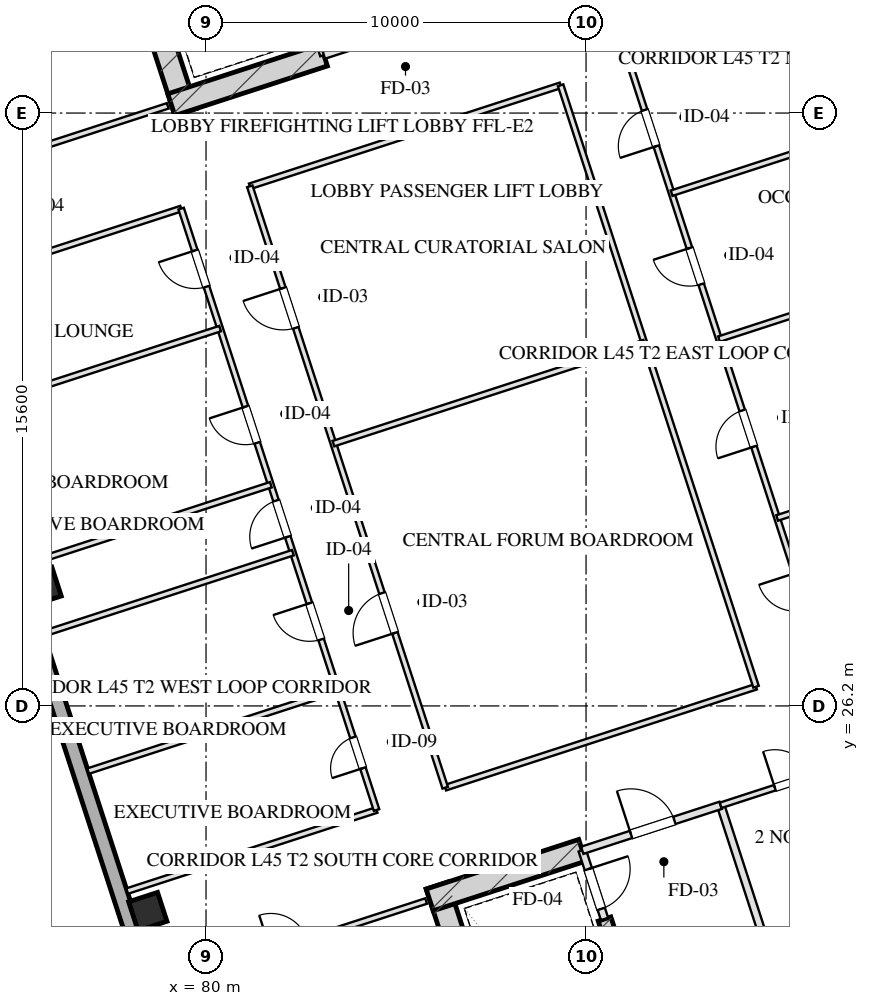
"""IFC4 building model, lengths in metres.
Left out: names, types, materials, properties, quantities, classifications, styles, units other than length and angle.
Written with IfcOpenShell. Run it as: python <this file> out.ifc"""

import sys

from ifc_helpers import new_model, si_unit, direction, frame, frame_2d, origin, origin_2d, place, context, subcontext, project, spatial, rectangle, hollow_rectangle, extrude, element, fill, save


model = new_model("IFC4")
c1 = context("Model", 3, precision=1e-05, world=origin(), true_north=direction((0.0, 1.0)))
c2 = subcontext(c1, "Body", "Model", "MODEL_VIEW")
j1 = project(units=[si_unit("LENGTHUNIT", "METRE"), si_unit("PLANEANGLEUNIT", "RADIAN")], contexts=[c1])
p1 = place(None, origin())
s1 = spatial("IfcSite", under=j1, at=p1, CompositionType="ELEMENT")
p2 = place(p1, origin())
s2 = spatial("IfcBuilding", under=s1, at=p2, CompositionType="ELEMENT")
p3 = place(p2, frame((0.0, 0.0, 170.2)))
s3 = spatial("IfcBuildingStorey", under=s2, at=p3, CompositionType="ELEMENT", Elevation=170.2)
p4 = place(p3, frame((86.078, 21.475, 0.0), z_axis=(0.0, 0.0, 1.0), x_axis=(0.309017938678, -0.951056209472, 0.0)))
e1 = element("IfcWall", 1, at=p4, inside=s3, PredefinedType="SHEAR", context=c2, shape_type="SweptSolid", body=[
    extrude(rectangle(XDim=9.48, YDim=0.6, at=frame_2d((4.74, 0.0))), origin(), (0.0, 0.0, 1.0), 3.45),
])
p5 = place(p3, frame((90.486, 20.594, 0.0), z_axis=(0.0, 0.0, 1.0), x_axis=(0.309020428229, -0.951055400562, 0.0)))
e2 = element("IfcWall", 2, at=p5, inside=s3, PredefinedType="SHEAR", context=c2, shape_type="SweptSolid", body=[
    extrude(rectangle(XDim=6.98, YDim=0.35, at=frame_2d((3.49, 0.0))), origin(), (0.0, 0.0, 1.0), 3.45),
])
p6 = place(p3, frame((85.886, 21.097, 0.0), z_axis=(0.0, 0.0, 1.0), x_axis=(0.951068073652, 0.308981422225, 0.0)))
e3 = element("IfcWall", 3, at=p6, inside=s3, PredefinedType="SHEAR", context=c2, shape_type="SweptSolid", body=[
    extrude(rectangle(XDim=4.22, YDim=0.6, at=frame_2d((2.11, 0.0))), origin(), (0.0, 0.0, 1.0), 3.45),
])
p7 = place(p3, frame((79.466, 41.828, 0.0), z_axis=(0.0, 0.0, 1.0), x_axis=(-0.309041232772, 0.951048640421, 0.0)))
e4 = element("IfcWall", 4, at=p7, inside=s3, PredefinedType="SHEAR", context=c2, shape_type="SweptSolid", body=[
    extrude(rectangle(XDim=9.48, YDim=0.6, at=frame_2d((4.74, 0.0))), origin(), (0.0, 0.0, 1.0), 3.45),
])
p8 = place(p3, frame((79.087, 42.021, 0.0), z_axis=(0.0, 0.0, 1.0), x_axis=(0.951062550203, 0.3089984233, 0.0)))
e5 = element("IfcWall", 5, at=p8, inside=s3, PredefinedType="SHEAR", context=c2, shape_type="SweptSolid", body=[
    extrude(rectangle(XDim=4.22, YDim=0.6, at=frame_2d((2.11, 0.0))), origin(), (0.0, 0.0, 1.0), 3.45),
])
for number, where, z_axis, x_axis in (
    (6, (78.468, 20.79, 0.0), (0.0, 0.0, 1.0), (0.951, 0.309, 0.0)),
    (7, (75.687, 29.349, 0.0), (0.0, 0.0, 1.0), (0.951, 0.309, 0.0)),
):
    element("IfcColumn", number, at=place(p3, frame(where, z_axis=z_axis, x_axis=x_axis)), inside=s3, PredefinedType="COLUMN", context=c2, shape_type="SweptSolid", body=[
        extrude(hollow_rectangle(XDim=0.8, YDim=0.8, WallThickness=0.028, at=origin_2d()), origin(), (0.0, 0.0, 1.0), 3.451),
    ])
p9 = place(p3, frame((81.776, 8.827, 0.0), z_axis=(0.0, 0.0, 1.0), x_axis=(-0.309014228706, 0.951057414911, 0.0)))
e8 = element("IfcWall", 8, at=p9, inside=s3, PredefinedType="SOLIDWALL", context=c2, shape_type="SweptSolid", body=[
    extrude(rectangle(XDim=42.8, YDim=0.4, at=frame_2d((21.4, 0.0))), origin(), (0.0, 0.0, 1.0), 2.61),
])
p10 = place(p3, frame((89.899, 22.401, 0.0), z_axis=(0.0, 0.0, 1.0), x_axis=(0.308932062672, -0.951084108086, 0.0)))
e9 = element("IfcWall", 9, at=p10, inside=s3, PredefinedType="PARTITIONING", context=c2, shape_type="SweptSolid", body=[
    extrude(rectangle(XDim=1.9, YDim=0.2, at=frame_2d((0.95, 0.0))), origin(), (0.0, 0.0, 1.0), 3.175),
])
p11 = place(p10, frame((0.52, 0.0, 0.0)))
e10 = element("IfcOpeningElement", 10, at=p11, cuts=e9, PredefinedType="OPENING", context=c2, shape_type="SweptSolid", body=[
    extrude(rectangle(XDim=1.1, YDim=2.05, at=frame_2d((0.55, 1.025))), frame((0.0, 0.11, 0.0), z_axis=(0.0, -1.0, 0.0), x_axis=(1.0, 0.0, 0.0)), (0.0, 0.0, 1.0), 0.22),
])
p12 = place(p3, frame((93.542, 23.585, 0.0), z_axis=(0.0, 0.0, 1.0), x_axis=(0.309042196757, -0.951048327176, 0.0)))
e11 = element("IfcWall", 11, at=p12, inside=s3, PredefinedType="PARTITIONING", context=c2, shape_type="SweptSolid", body=[
    extrude(rectangle(XDim=8.43, YDim=0.2, at=frame_2d((4.215, 0.0))), origin(), (0.0, 0.0, 1.0), 3.175),
])
p13 = place(p3, frame((89.899, 22.401, 0.0), z_axis=(0.0, 0.0, 1.0), x_axis=(0.951046716504, 0.309047153403, 0.0)))
e12 = element("IfcWall", 12, at=p13, inside=s3, PredefinedType="PARTITIONING", context=c2, shape_type="SweptSolid", body=[
    extrude(rectangle(XDim=3.83, YDim=0.2, at=frame_2d((1.915, 0.0))), origin(), (0.0, 0.0, 1.0), 3.175),
])
p14 = place(p13, frame((1.35, 0.0, 0.0)))
e13 = element("IfcOpeningElement", 13, at=p14, cuts=e12, PredefinedType="OPENING", context=c2, shape_type="SweptSolid", body=[
    extrude(rectangle(XDim=1.2, YDim=2.05, at=frame_2d((0.6, 1.025))), frame((0.0, 0.11, 0.0), z_axis=(0.0, -1.0, 0.0), x_axis=(1.0, 0.0, 0.0)), (0.0, 0.0, 1.0), 0.22),
])
p15 = place(p3, frame((93.542, 23.585, 0.0), z_axis=(0.0, 0.0, 1.0), x_axis=(0.951063829732, 0.308994485023, 0.0)))
e14 = element("IfcWall", 14, at=p15, inside=s3, PredefinedType="PARTITIONING", context=c2, shape_type="SweptSolid", body=[
    extrude(rectangle(XDim=4.4, YDim=0.15, at=frame_2d((2.2, 0.0))), origin(), (0.0, 0.0, 1.0), 3.175),
])
p16 = place(p15, frame((1.5, 0.0, 0.0)))
e15 = element("IfcOpeningElement", 15, at=p16, cuts=e14, PredefinedType="OPENING", context=c2, shape_type="SweptSolid", body=[
    extrude(rectangle(XDim=1.0, YDim=2.05, at=frame_2d((0.5, 1.025))), frame((0.0, 0.085, 0.0), z_axis=(0.0, -1.0, 0.0), x_axis=(1.0, 0.0, 0.0)), (0.0, 0.0, 1.0), 0.17),
])
p17 = place(p3, frame((94.871, 19.495, 0.0), z_axis=(0.0, 0.0, 1.0), x_axis=(0.951042223598, 0.309060979314, 0.0)))
e16 = element("IfcWall", 16, at=p17, inside=s3, PredefinedType="PARTITIONING", context=c2, shape_type="SweptSolid", body=[
    extrude(rectangle(XDim=4.4, YDim=0.15, at=frame_2d((2.2, 0.0))), origin(), (0.0, 0.0, 1.0), 3.175),
])
p18 = place(p3, frame((83.101, 43.324, 0.0), z_axis=(0.0, 0.0, 1.0), x_axis=(-0.309048298632, 0.951046344356, 0.0)))
e17 = element("IfcWall", 17, at=p18, inside=s3, PredefinedType="PARTITIONING", context=c2, shape_type="SweptSolid", body=[
    extrude(rectangle(XDim=1.9, YDim=0.2, at=frame_2d((0.95, 0.0))), origin(), (0.0, 0.0, 1.0), 3.175),
])
p19 = place(p18, frame((0.52, 0.0, 0.0)))
e18 = element("IfcOpeningElement", 18, at=p19, cuts=e17, PredefinedType="OPENING", context=c2, shape_type="SweptSolid", body=[
    extrude(rectangle(XDim=1.1, YDim=2.05, at=frame_2d((0.55, 1.025))), frame((0.0, 0.11, 0.0), z_axis=(0.0, -1.0, 0.0), x_axis=(1.0, 0.0, 0.0)), (0.0, 0.0, 1.0), 0.22),
])
p20 = place(p3, frame((83.101, 43.324, 0.0), z_axis=(0.0, 0.0, 1.0), x_axis=(0.951052804469, 0.309028417967, 0.0)))
e19 = element("IfcWall", 19, at=p20, inside=s3, PredefinedType="PARTITIONING", context=c2, shape_type="SweptSolid", body=[
    extrude(rectangle(XDim=3.83, YDim=0.2, at=frame_2d((1.915, 0.0))), origin(), (0.0, 0.0, 1.0), 3.175),
])
p21 = place(p20, frame((1.35, 0.0, 0.0)))
e20 = element("IfcOpeningElement", 20, at=p21, cuts=e19, PredefinedType="OPENING", context=c2, shape_type="SweptSolid", body=[
    extrude(rectangle(XDim=1.2, YDim=2.05, at=frame_2d((0.6, 1.025))), frame((0.0, 0.11, 0.0), z_axis=(0.0, -1.0, 0.0), x_axis=(1.0, 0.0, 0.0)), (0.0, 0.0, 1.0), 0.22),
])
p22 = place(p3, frame((78.753, 18.78, 0.0), z_axis=(0.0, 0.0, 1.0), x_axis=(0.951060977215, 0.309003264738, 0.0)))
e21 = element("IfcWall", 21, at=p22, inside=s3, PredefinedType="PARTITIONING", context=c2, shape_type="SweptSolid", body=[
    extrude(rectangle(XDim=7.4, YDim=0.15, at=frame_2d((3.7, 0.0))), origin(), (0.0, 0.0, 1.0), 3.175),
])
p23 = place(p22, frame((3.108, 0.0, 0.0)))
e22 = element("IfcOpeningElement", 22, at=p23, cuts=e21, PredefinedType="OPENING", context=c2, shape_type="SweptSolid", body=[
    extrude(rectangle(XDim=1.0, YDim=2.05, at=frame_2d((0.5, 1.025))), frame((0.0, 0.085, 0.0), z_axis=(0.0, -1.0, 0.0), x_axis=(1.0, 0.0, 0.0)), (0.0, 0.0, 1.0), 0.17),
])
p24 = place(p3, frame((71.955, 39.703, 0.0), z_axis=(0.0, 0.0, 1.0), x_axis=(0.951060977215, 0.309003264738, 0.0)))
e23 = element("IfcWall", 23, at=p24, inside=s3, PredefinedType="PARTITIONING", context=c2, shape_type="SweptSolid", body=[
    extrude(rectangle(XDim=7.4, YDim=0.15, at=frame_2d((3.7, 0.0))), origin(), (0.0, 0.0, 1.0), 3.175),
])
p25 = place(p24, frame((3.108, 0.0, 0.0)))
e24 = element("IfcOpeningElement", 24, at=p25, cuts=e23, PredefinedType="OPENING", context=c2, shape_type="SweptSolid", body=[
    extrude(rectangle(XDim=1.0, YDim=2.05, at=frame_2d((0.5, 1.025))), frame((0.0, 0.085, 0.0), z_axis=(0.0, -1.0, 0.0), x_axis=(1.0, 0.0, 0.0)), (0.0, 0.0, 1.0), 0.17),
])
p26 = place(p3, frame((77.925, 21.328, 0.0), z_axis=(0.0, 0.0, 1.0), x_axis=(0.951061887302, 0.309000463626, 0.0)))
e25 = element("IfcWall", 25, at=p26, inside=s3, PredefinedType="PARTITIONING", context=c2, shape_type="SweptSolid", body=[
    extrude(rectangle(XDim=6.9, YDim=0.15, at=frame_2d((3.45, 0.0))), origin(), (0.0, 0.0, 1.0), 3.175),
])
p27 = place(p3, frame((86.294, 24.048, 0.0), z_axis=(0.0, 0.0, 1.0), x_axis=(0.951052008164, 0.309030868631, 0.0)))
e26 = element("IfcWall", 26, at=p27, inside=s3, PredefinedType="PARTITIONING", context=c2, shape_type="SweptSolid", body=[
    extrude(rectangle(XDim=8.6, YDim=0.15, at=frame_2d((4.3, 0.0))), origin(), (0.0, 0.0, 1.0), 3.175),
])
p28 = place(p3, frame((72.783, 37.154, 0.0), z_axis=(0.0, 0.0, 1.0), x_axis=(0.951051488548, 0.309032467762, 0.0)))
e27 = element("IfcWall", 27, at=p28, inside=s3, PredefinedType="PARTITIONING", context=c2, shape_type="SweptSolid", body=[
    extrude(rectangle(XDim=6.9, YDim=0.15, at=frame_2d((3.45, 0.0))), origin(), (0.0, 0.0, 1.0), 3.175),
])
p29 = place(p3, frame((81.152, 39.873, 0.0), z_axis=(0.0, 0.0, 1.0), x_axis=(0.951057640494, 0.309013534425, 0.0)))
e28 = element("IfcWall", 28, at=p29, inside=s3, PredefinedType="PARTITIONING", context=c2, shape_type="SweptSolid", body=[
    extrude(rectangle(XDim=8.6, YDim=0.15, at=frame_2d((4.3, 0.0))), origin(), (0.0, 0.0, 1.0), 3.175),
])
p30 = place(p3, frame((91.138, 43.118, 0.0), z_axis=(0.0, 0.0, 1.0), x_axis=(0.951054972381, 0.309021746015, 0.0)))
e29 = element("IfcWall", 29, at=p30, inside=s3, PredefinedType="PARTITIONING", context=c2, shape_type="SweptSolid", body=[
    extrude(rectangle(XDim=11.5, YDim=0.15, at=frame_2d((5.75, 0.0))), origin(), (0.0, 0.0, 1.0), 3.175),
])
p31 = place(p3, frame((84.487, 23.46, 0.0), z_axis=(0.0, 0.0, 1.0), x_axis=(-0.30901773025, 0.951056277195, 0.0)))
e30 = element("IfcWall", 30, at=p31, inside=s3, PredefinedType="PARTITIONING", context=c2, shape_type="SweptSolid", body=[
    extrude(rectangle(XDim=16.64, YDim=0.15, at=frame_2d((8.32, 0.0))), origin(), (0.0, 0.0, 1.0), 3.175),
])
p32 = place(p31, frame((1.16, 0.0, 0.0)))
e31 = element("IfcOpeningElement", 31, at=p32, cuts=e30, PredefinedType="OPENING", context=c2, shape_type="SweptSolid", body=[
    extrude(rectangle(XDim=0.85, YDim=2.05, at=frame_2d((0.425, 1.025))), frame((0.0, 0.085, 0.0), z_axis=(0.0, -1.0, 0.0), x_axis=(1.0, 0.0, 0.0)), (0.0, 0.0, 1.0), 0.17),
])
p33 = place(p31, frame((4.72, 0.0, 0.0)))
e32 = element("IfcOpeningElement", 32, at=p33, cuts=e30, PredefinedType="OPENING", context=c2, shape_type="SweptSolid", body=[
    extrude(rectangle(XDim=1.0, YDim=2.05, at=frame_2d((0.5, 1.025))), frame((0.0, 0.085, 0.0), z_axis=(0.0, -1.0, 0.0), x_axis=(1.0, 0.0, 0.0)), (0.0, 0.0, 1.0), 0.17),
])
p34 = place(p31, frame((7.56, 0.0, 0.0)))
e33 = element("IfcOpeningElement", 33, at=p34, cuts=e30, PredefinedType="OPENING", context=c2, shape_type="SweptSolid", body=[
    extrude(rectangle(XDim=1.0, YDim=2.05, at=frame_2d((0.5, 1.025))), frame((0.0, 0.085, 0.0), z_axis=(0.0, -1.0, 0.0), x_axis=(1.0, 0.0, 0.0)), (0.0, 0.0, 1.0), 0.17),
])
p35 = place(p31, frame((10.16, 0.0, 0.0)))
e34 = element("IfcOpeningElement", 34, at=p35, cuts=e30, PredefinedType="OPENING", context=c2, shape_type="SweptSolid", body=[
    extrude(rectangle(XDim=1.0, YDim=2.05, at=frame_2d((0.5, 1.025))), frame((0.0, 0.085, 0.0), z_axis=(0.0, -1.0, 0.0), x_axis=(1.0, 0.0, 0.0)), (0.0, 0.0, 1.0), 0.17),
])
p36 = place(p31, frame((14.48, 0.0, 0.0)))
e35 = element("IfcOpeningElement", 35, at=p36, cuts=e30, PredefinedType="OPENING", context=c2, shape_type="SweptSolid", body=[
    extrude(rectangle(XDim=1.0, YDim=2.05, at=frame_2d((0.5, 1.025))), frame((0.0, 0.085, 0.0), z_axis=(0.0, -1.0, 0.0), x_axis=(1.0, 0.0, 0.0)), (0.0, 0.0, 1.0), 0.17),
])
p37 = place(p3, frame((86.294, 24.048, 0.0), z_axis=(0.0, 0.0, 1.0), x_axis=(-0.309004459387, 0.951060589068, 0.0)))
e36 = element("IfcWall", 36, at=p37, inside=s3, PredefinedType="PARTITIONING", context=c2, shape_type="SweptSolid", body=[
    extrude(rectangle(XDim=16.64, YDim=0.15, at=frame_2d((8.32, 0.0))), origin(), (0.0, 0.0, 1.0), 3.175),
])
p38 = place(p37, frame((4.284, 0.0, 0.0)))
e37 = element("IfcOpeningElement", 37, at=p38, cuts=e36, PredefinedType="OPENING", context=c2, shape_type="SweptSolid", body=[
    extrude(rectangle(XDim=1.1, YDim=2.05, at=frame_2d((0.55, 1.025))), frame((0.0, 0.085, 0.0), z_axis=(0.0, -1.0, 0.0), x_axis=(1.0, 0.0, 0.0)), (0.0, 0.0, 1.0), 0.17),
])
p39 = place(p37, frame((12.724, 0.0, 0.0)))
e38 = element("IfcOpeningElement", 38, at=p39, cuts=e36, PredefinedType="OPENING", context=c2, shape_type="SweptSolid", body=[
    extrude(rectangle(XDim=1.1, YDim=2.05, at=frame_2d((0.55, 1.025))), frame((0.0, 0.085, 0.0), z_axis=(0.0, -1.0, 0.0), x_axis=(1.0, 0.0, 0.0)), (0.0, 0.0, 1.0), 0.17),
])
p40 = place(p3, frame((94.473, 26.705, 0.0), z_axis=(0.0, 0.0, 1.0), x_axis=(-0.309022042254, 0.951054876125, 0.0)))
e39 = element("IfcWall", 39, at=p40, inside=s3, PredefinedType="PARTITIONING", context=c2, shape_type="SweptSolid", body=[
    extrude(rectangle(XDim=16.64, YDim=0.15, at=frame_2d((8.32, 0.0))), origin(), (0.0, 0.0, 1.0), 3.175),
])
p41 = place(p3, frame((96.28, 27.292, 0.0), z_axis=(0.0, 0.0, 1.0), x_axis=(-0.309008771245, 0.951059188113, 0.0)))
e40 = element("IfcWall", 40, at=p41, inside=s3, PredefinedType="PARTITIONING", context=c2, shape_type="SweptSolid", body=[
    extrude(rectangle(XDim=16.64, YDim=0.15, at=frame_2d((8.32, 0.0))), origin(), (0.0, 0.0, 1.0), 3.175),
])
p42 = place(p41, frame((1.526, 0.0, 0.0)))
e41 = element("IfcOpeningElement", 41, at=p42, cuts=e40, PredefinedType="OPENING", context=c2, shape_type="SweptSolid", body=[
    extrude(rectangle(XDim=1.0, YDim=2.05, at=frame_2d((0.5, 1.025))), frame((0.0, 0.085, 0.0), z_axis=(0.0, -1.0, 0.0), x_axis=(1.0, 0.0, 0.0)), (0.0, 0.0, 1.0), 0.17),
])
p43 = place(p41, frame((6.026, 0.0, 0.0)))
e42 = element("IfcOpeningElement", 42, at=p43, cuts=e40, PredefinedType="OPENING", context=c2, shape_type="SweptSolid", body=[
    extrude(rectangle(XDim=1.0, YDim=2.05, at=frame_2d((0.5, 1.025))), frame((0.0, 0.085, 0.0), z_axis=(0.0, -1.0, 0.0), x_axis=(1.0, 0.0, 0.0)), (0.0, 0.0, 1.0), 0.17),
])
p44 = place(p41, frame((10.519, 0.0, 0.0)))
e43 = element("IfcOpeningElement", 43, at=p44, cuts=e40, PredefinedType="OPENING", context=c2, shape_type="SweptSolid", body=[
    extrude(rectangle(XDim=1.0, YDim=2.05, at=frame_2d((0.5, 1.025))), frame((0.0, 0.085, 0.0), z_axis=(0.0, -1.0, 0.0), x_axis=(1.0, 0.0, 0.0)), (0.0, 0.0, 1.0), 0.17),
])
p45 = place(p41, frame((14.338, 0.0, 0.0)))
e44 = element("IfcOpeningElement", 44, at=p45, cuts=e40, PredefinedType="OPENING", context=c2, shape_type="SweptSolid", body=[
    extrude(rectangle(XDim=1.0, YDim=2.05, at=frame_2d((0.5, 1.025))), frame((0.0, 0.085, 0.0), z_axis=(0.0, -1.0, 0.0), x_axis=(1.0, 0.0, 0.0)), (0.0, 0.0, 1.0), 0.17),
])
p46 = place(p3, frame((83.352, 33.102, 0.0), z_axis=(0.0, 0.0, 1.0), x_axis=(0.951057640494, 0.309013534425, 0.0)))
e45 = element("IfcWall", 45, at=p46, inside=s3, PredefinedType="PARTITIONING", context=c2, shape_type="SweptSolid", body=[
    extrude(rectangle(XDim=8.6, YDim=0.15, at=frame_2d((4.3, 0.0))), origin(), (0.0, 0.0, 1.0), 3.175),
])
for number, where, z_axis, x_axis in (
    (46, (76.899, 24.486, 0.0), (0.0, 0.0, 1.0), (0.951, 0.309, 0.0)),
    (47, (75.725, 28.1, 0.0), (0.0, 0.0, 1.0), (0.951, 0.309, 0.0)),
    (48, (75.144, 29.888, 0.0), (0.0, 0.0, 1.0), (0.951, 0.309, 0.0)),
    (49, (73.809, 33.996, 0.0), (0.0, 0.0, 1.0), (0.951, 0.309, 0.0)),
):
    element("IfcWall", number, at=place(p3, frame(where, z_axis=z_axis, x_axis=x_axis)), inside=s3, PredefinedType="PARTITIONING", context=c2, shape_type="SweptSolid", body=[
        extrude(rectangle(XDim=6.9, YDim=0.15, at=frame_2d((3.45, 0.0))), origin(), (0.0, 0.0, 1.0), 3.175),
    ])
p47 = place(p3, frame((95.028, 31.146, 0.0), z_axis=(0.0, 0.0, 1.0), x_axis=(0.951056999652, 0.309015506751, 0.0)))
e50 = element("IfcWall", 50, at=p47, inside=s3, PredefinedType="PARTITIONING", context=c2, shape_type="SweptSolid", body=[
    extrude(rectangle(XDim=11.5, YDim=0.15, at=frame_2d((5.75, 0.0))), origin(), (0.0, 0.0, 1.0), 3.175),
])
p48 = place(p3, frame((93.499, 35.852, 0.0), z_axis=(0.0, 0.0, 1.0), x_axis=(0.951054972381, 0.309021746015, 0.0)))
e51 = element("IfcWall", 51, at=p48, inside=s3, PredefinedType="PARTITIONING", context=c2, shape_type="SweptSolid", body=[
    extrude(rectangle(XDim=11.5, YDim=0.15, at=frame_2d((5.75, 0.0))), origin(), (0.0, 0.0, 1.0), 3.175),
])
p49 = place(p3, frame((92.251, 39.691, 0.0), z_axis=(0.0, 0.0, 1.0), x_axis=(0.951063238644, 0.308996304347, 0.0)))
e52 = element("IfcWall", 52, at=p49, inside=s3, PredefinedType="PARTITIONING", context=c2, shape_type="SweptSolid", body=[
    extrude(rectangle(XDim=11.5, YDim=0.15, at=frame_2d((5.75, 0.0))), origin(), (0.0, 0.0, 1.0), 3.175),
])
p50 = place(p11, origin())
e53 = element("IfcDoor", 53, at=p50, inside=s3, OperationType="SINGLE_SWING_LEFT", PredefinedType="DOOR", context=c2, shape_type="SweptSolid", body=[
    extrude(rectangle(XDim=1.1, YDim=2.05, at=frame_2d((0.55, 1.025))), frame((0.0, 0.025, 0.0), z_axis=(0.0, -1.0, 0.0), x_axis=(1.0, 0.0, 0.0)), (0.0, 0.0, 1.0), 0.05),
])
fill(e10, e53)
p51 = place(p14, origin())
e54 = element("IfcDoor", 54, at=p51, inside=s3, OperationType="SINGLE_SWING_LEFT", PredefinedType="DOOR", context=c2, shape_type="SweptSolid", body=[
    extrude(rectangle(XDim=1.2, YDim=2.05, at=frame_2d((0.6, 1.025))), frame((0.0, 0.025, 0.0), z_axis=(0.0, -1.0, 0.0), x_axis=(1.0, 0.0, 0.0)), (0.0, 0.0, 1.0), 0.05),
])
fill(e13, e54)
p52 = place(p16, origin())
e55 = element("IfcDoor", 55, at=p52, inside=s3, OperationType="SINGLE_SWING_LEFT", PredefinedType="DOOR", context=c2, shape_type="SweptSolid", body=[
    extrude(rectangle(XDim=1.0, YDim=2.05, at=frame_2d((0.5, 1.025))), frame((0.0, 0.025, 0.0), z_axis=(0.0, -1.0, 0.0), x_axis=(1.0, 0.0, 0.0)), (0.0, 0.0, 1.0), 0.05),
])
fill(e15, e55)
p53 = place(p32, origin())
e56 = element("IfcDoor", 56, at=p53, inside=s3, OperationType="SINGLE_SWING_LEFT", PredefinedType="DOOR", context=c2, shape_type="SweptSolid", body=[
    extrude(rectangle(XDim=0.85, YDim=2.05, at=frame_2d((0.425, 1.025))), frame((0.0, 0.025, 0.0), z_axis=(0.0, -1.0, 0.0), x_axis=(1.0, 0.0, 0.0)), (0.0, 0.0, 1.0), 0.05),
])
fill(e31, e56)
p54 = place(p33, origin())
e57 = element("IfcDoor", 57, at=p54, inside=s3, OperationType="SINGLE_SWING_RIGHT", PredefinedType="DOOR", context=c2, shape_type="SweptSolid", body=[
    extrude(rectangle(XDim=1.0, YDim=2.05, at=frame_2d((0.5, 1.025))), frame((0.0, 0.025, 0.0), z_axis=(0.0, -1.0, 0.0), x_axis=(1.0, 0.0, 0.0)), (0.0, 0.0, 1.0), 0.05),
])
fill(e32, e57)
p55 = place(p34, origin())
e58 = element("IfcDoor", 58, at=p55, inside=s3, OperationType="SINGLE_SWING_LEFT", PredefinedType="DOOR", context=c2, shape_type="SweptSolid", body=[
    extrude(rectangle(XDim=1.0, YDim=2.05, at=frame_2d((0.5, 1.025))), frame((0.0, 0.025, 0.0), z_axis=(0.0, -1.0, 0.0), x_axis=(1.0, 0.0, 0.0)), (0.0, 0.0, 1.0), 0.05),
])
fill(e33, e58)
p56 = place(p35, origin())
e59 = element("IfcDoor", 59, at=p56, inside=s3, OperationType="SINGLE_SWING_RIGHT", PredefinedType="DOOR", context=c2, shape_type="SweptSolid", body=[
    extrude(rectangle(XDim=1.0, YDim=2.05, at=frame_2d((0.5, 1.025))), frame((0.0, 0.025, 0.0), z_axis=(0.0, -1.0, 0.0), x_axis=(1.0, 0.0, 0.0)), (0.0, 0.0, 1.0), 0.05),
])
fill(e34, e59)
p57 = place(p36, origin())
e60 = element("IfcDoor", 60, at=p57, inside=s3, OperationType="SINGLE_SWING_RIGHT", PredefinedType="DOOR", context=c2, shape_type="SweptSolid", body=[
    extrude(rectangle(XDim=1.0, YDim=2.05, at=frame_2d((0.5, 1.025))), frame((0.0, 0.025, 0.0), z_axis=(0.0, -1.0, 0.0), x_axis=(1.0, 0.0, 0.0)), (0.0, 0.0, 1.0), 0.05),
])
fill(e35, e60)
p58 = place(p38, origin())
e61 = element("IfcDoor", 61, at=p58, inside=s3, OperationType="SINGLE_SWING_LEFT", PredefinedType="DOOR", context=c2, shape_type="SweptSolid", body=[
    extrude(rectangle(XDim=1.1, YDim=2.05, at=frame_2d((0.55, 1.025))), frame((0.0, 0.025, 0.0), z_axis=(0.0, -1.0, 0.0), x_axis=(1.0, 0.0, 0.0)), (0.0, 0.0, 1.0), 0.05),
])
fill(e37, e61)
p59 = place(p39, origin())
e62 = element("IfcDoor", 62, at=p59, inside=s3, OperationType="SINGLE_SWING_RIGHT", PredefinedType="DOOR", context=c2, shape_type="SweptSolid", body=[
    extrude(rectangle(XDim=1.1, YDim=2.05, at=frame_2d((0.55, 1.025))), frame((0.0, 0.025, 0.0), z_axis=(0.0, -1.0, 0.0), x_axis=(1.0, 0.0, 0.0)), (0.0, 0.0, 1.0), 0.05),
])
fill(e38, e62)
p60 = place(p43, origin())
e63 = element("IfcDoor", 63, at=p60, inside=s3, OperationType="SINGLE_SWING_LEFT", PredefinedType="DOOR", context=c2, shape_type="SweptSolid", body=[
    extrude(rectangle(XDim=1.0, YDim=2.05, at=frame_2d((0.5, 1.025))), frame((0.0, 0.025, 0.0), z_axis=(0.0, -1.0, 0.0), x_axis=(1.0, 0.0, 0.0)), (0.0, 0.0, 1.0), 0.05),
])
fill(e42, e63)
p61 = place(p44, origin())
e64 = element("IfcDoor", 64, at=p61, inside=s3, OperationType="SINGLE_SWING_RIGHT", PredefinedType="DOOR", context=c2, shape_type="SweptSolid", body=[
    extrude(rectangle(XDim=1.0, YDim=2.05, at=frame_2d((0.5, 1.025))), frame((0.0, 0.025, 0.0), z_axis=(0.0, -1.0, 0.0), x_axis=(1.0, 0.0, 0.0)), (0.0, 0.0, 1.0), 0.05),
])
fill(e43, e64)
p62 = place(p45, origin())
e65 = element("IfcDoor", 65, at=p62, inside=s3, OperationType="SINGLE_SWING_LEFT", PredefinedType="DOOR", context=c2, shape_type="SweptSolid", body=[
    extrude(rectangle(XDim=1.0, YDim=2.05, at=frame_2d((0.5, 1.025))), frame((0.0, 0.025, 0.0), z_axis=(0.0, -1.0, 0.0), x_axis=(1.0, 0.0, 0.0)), (0.0, 0.0, 1.0), 0.05),
])
fill(e44, e65)
save(model, sys.argv[1])
